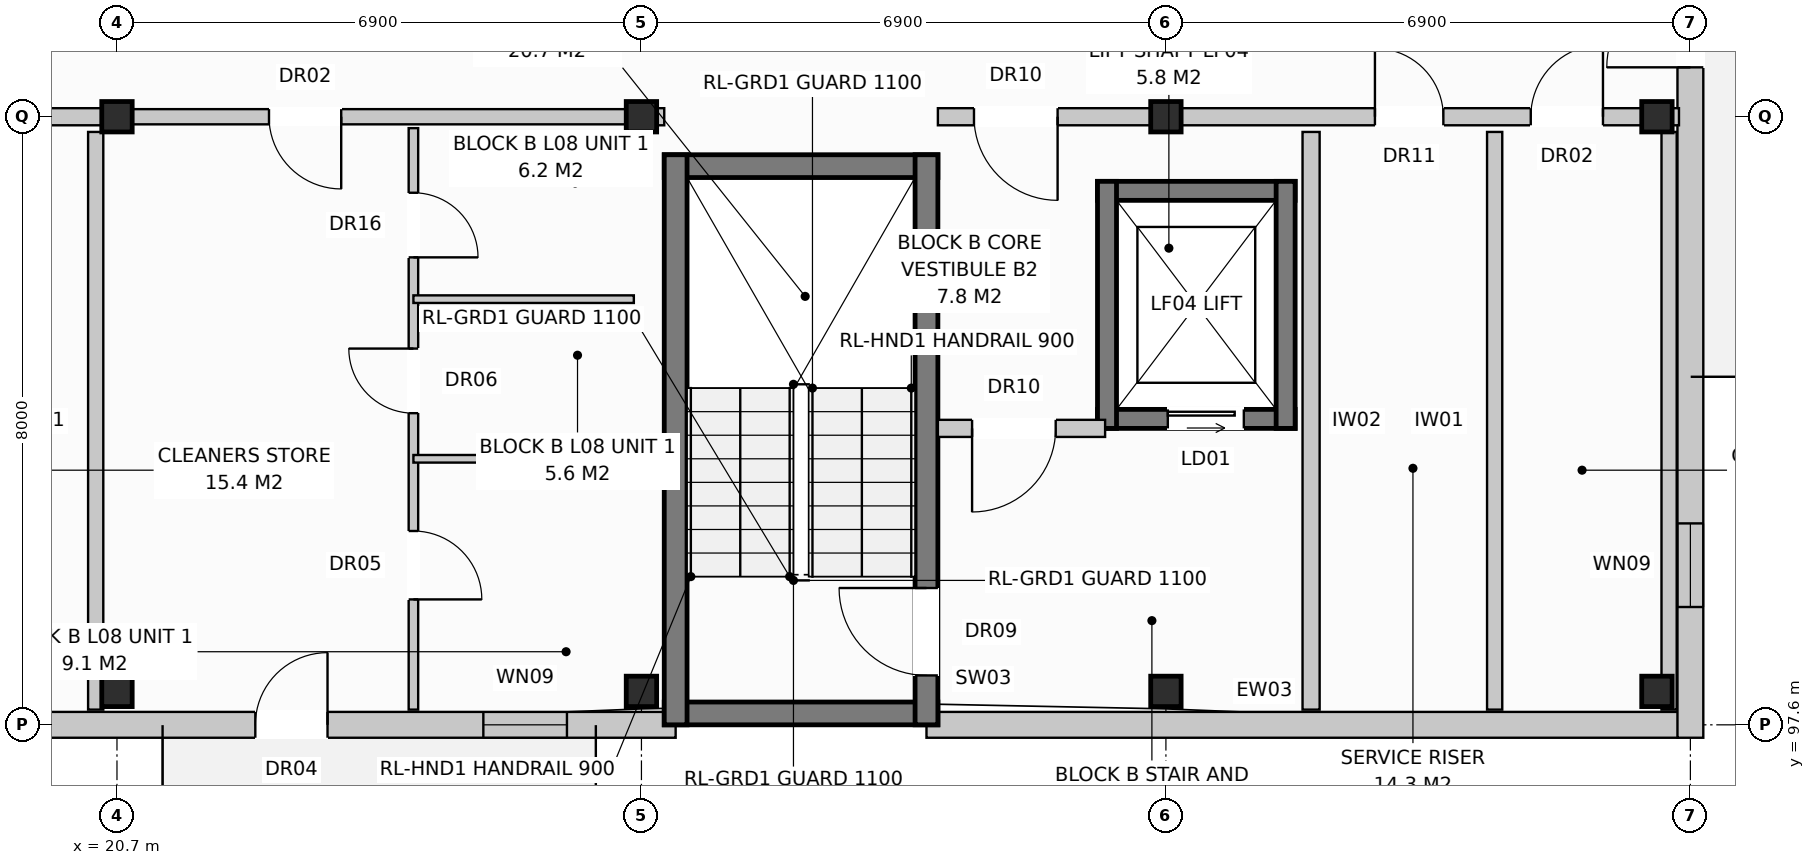
"""IFC4 building model, lengths in metres.
Left out: names, types, materials, properties, quantities, classifications, styles, units other than length and angle.
Written with IfcOpenShell. Run it as: python <this file> out.ifc"""

import sys

from ifc_helpers import new_model, si_unit, direction, frame, frame_2d, origin, origin_with_axes, origin_2d, place, context, subcontext, project, spatial, rectangle, extrude, element, fill, save


model = new_model("IFC4")
c1 = context("Model", 3, precision=1e-05, world=origin(), true_north=direction((0.0, 1.0)))
c2 = subcontext(c1, "Body", "Model", "MODEL_VIEW")
j1 = project(units=[si_unit("LENGTHUNIT", "METRE"), si_unit("PLANEANGLEUNIT", "RADIAN")], contexts=[c1])
p1 = place(None, origin())
s1 = spatial("IfcSite", under=j1, at=p1, CompositionType="ELEMENT")
p2 = place(p1, origin())
s2 = spatial("IfcBuilding", under=s1, at=p2, CompositionType="ELEMENT")
p3 = place(p2, frame((0.0, 0.0, 27.2)))
s3 = spatial("IfcBuildingStorey", under=s2, at=p3, CompositionType="ELEMENT", Elevation=27.2)
for number, where, z_axis, x_axis in (
    (1, (20.7, 98.04, 0.0), (0.0, 0.0, 1.0), (1.0, 0.0, 0.0)),
    (2, (20.7, 105.6, 0.0), (0.0, 0.0, 1.0), (1.0, 0.0, 0.0)),
    (3, (27.6, 98.04, 0.0), (0.0, 0.0, 1.0), (1.0, 0.0, 0.0)),
    (4, (27.6, 105.6, 0.0), (0.0, 0.0, 1.0), (1.0, 0.0, 0.0)),
    (5, (34.5, 98.04, 0.0), (0.0, 0.0, 1.0), (1.0, 0.0, 0.0)),
    (6, (34.5, 105.6, 0.0), (0.0, 0.0, 1.0), (1.0, 0.0, 0.0)),
    (7, (40.96, 98.04, 0.0), (0.0, 0.0, 1.0), (1.0, 0.0, 0.0)),
    (8, (40.96, 105.6, 0.0), (0.0, 0.0, 1.0), (1.0, 0.0, 0.0)),
):
    element("IfcColumn", number, at=place(p3, frame(where, z_axis=z_axis, x_axis=x_axis)), inside=s3, PredefinedType="COLUMN", context=c2, shape_type="SweptSolid", body=[
        extrude(rectangle(XDim=0.4, YDim=0.4, at=origin_2d()), origin(), (0.0, 0.0, 1.0), 3.2),
    ])
p4 = place(p3, frame((10.65, 97.6, 0.0), z_axis=(0.0, 0.0, 1.0), x_axis=(1.0, 0.0, 0.0)))
e9 = element("IfcWall", 9, at=p4, inside=s3, PredefinedType="STANDARD", context=c2, shape_type="SweptSolid", body=[
    extrude(rectangle(XDim=17.4, YDim=0.34, at=frame_2d((8.7, 0.0))), origin(), (0.0, 0.0, 1.0), 2.96),
])
p5 = place(p4, frame((11.87, 0.0, 0.0)))
e10 = element("IfcOpeningElement", 10, at=p5, cuts=e9, PredefinedType="OPENING", context=c2, shape_type="SweptSolid", body=[
    extrude(rectangle(XDim=0.95, YDim=2.1, at=frame_2d((0.475, 1.05))), frame((0.0, 0.182, 0.0), z_axis=(0.0, -1.0, 0.0), x_axis=(1.0, 0.0, 0.0)), (0.0, 0.0, 1.0), 0.364),
])
p6 = place(p4, frame((14.87, 0.0, 0.72)))
e11 = element("IfcOpeningElement", 11, at=p6, cuts=e9, PredefinedType="OPENING", context=c2, shape_type="SweptSolid", body=[
    extrude(rectangle(XDim=1.1, YDim=1.5, at=frame_2d((0.55, 0.75))), frame((0.0, 0.182, 0.0), z_axis=(0.0, -1.0, 0.0), x_axis=(1.0, 0.0, 0.0)), (0.0, 0.0, 1.0), 0.364),
])
p7 = place(p3, frame((31.35, 97.6, 0.0), z_axis=(0.0, 0.0, 1.0), x_axis=(1.0, 0.0, 0.0)))
e12 = element("IfcWall", 12, at=p7, inside=s3, PredefinedType="STANDARD", context=c2, shape_type="SweptSolid", body=[
    extrude(rectangle(XDim=9.89, YDim=0.34, at=frame_2d((4.945, 0.0))), origin(), (0.0, 0.0, 1.0), 2.96),
])
p8 = place(p3, frame((41.4, 97.43, 0.0), z_axis=(0.0, 0.0, 1.0), x_axis=(0.0, 1.0, 0.0)))
e13 = element("IfcWall", 13, at=p8, inside=s3, PredefinedType="STANDARD", context=c2, shape_type="SweptSolid", body=[
    extrude(rectangle(XDim=18.74, YDim=0.34, at=frame_2d((9.37, 0.0))), origin(), (0.0, 0.0, 1.0), 2.96),
])
p9 = place(p8, frame((8.82, 0.0, 0.0)))
e14 = element("IfcOpeningElement", 14, at=p9, cuts=e13, PredefinedType="OPENING", context=c2, shape_type="SweptSolid", body=[
    extrude(rectangle(XDim=1.1, YDim=2.1, at=frame_2d((0.55, 1.05))), frame((0.0, 0.182, 0.0), z_axis=(0.0, -1.0, 0.0), x_axis=(1.0, 0.0, 0.0)), (0.0, 0.0, 1.0), 0.364),
])
p10 = place(p8, frame((1.72, 0.0, 0.72)))
e15 = element("IfcOpeningElement", 15, at=p10, cuts=e13, PredefinedType="OPENING", context=c2, shape_type="SweptSolid", body=[
    extrude(rectangle(XDim=1.1, YDim=1.5, at=frame_2d((0.55, 0.75))), frame((0.0, 0.182, 0.0), z_axis=(0.0, -1.0, 0.0), x_axis=(1.0, 0.0, 0.0)), (0.0, 0.0, 1.0), 0.364),
])
p11 = place(p8, frame((15.92, 0.0, 0.72)))
e16 = element("IfcOpeningElement", 16, at=p11, cuts=e13, PredefinedType="OPENING", context=c2, shape_type="SweptSolid", body=[
    extrude(rectangle(XDim=1.1, YDim=1.5, at=frame_2d((0.55, 0.75))), frame((0.0, 0.182, 0.0), z_axis=(0.0, -1.0, 0.0), x_axis=(1.0, 0.0, 0.0)), (0.0, 0.0, 1.0), 0.364),
])
p12 = place(p3, frame((20.42, 97.8, 0.0), z_axis=(0.0, 0.0, 1.0), x_axis=(0.0, 1.0, 0.0)))
e17 = element("IfcWall", 17, at=p12, inside=s3, PredefinedType="PARTITIONING", context=c2, shape_type="SweptSolid", body=[
    extrude(rectangle(XDim=7.6, YDim=0.2, at=frame_2d((3.8, 0.0))), origin(), (0.0, 0.0, 1.0), 2.96),
])
p13 = place(p3, frame((10.8, 105.6, 0.0), z_axis=(0.0, 0.0, 1.0), x_axis=(1.0, 0.0, 0.0)))
e18 = element("IfcWall", 18, at=p13, inside=s3, PredefinedType="PARTITIONING", context=c2, shape_type="SweptSolid", body=[
    extrude(rectangle(XDim=9.9, YDim=0.225, at=frame_2d((4.95, 0.0))), origin(), (0.0, 0.0, 1.0), 2.4),
])
p14 = place(p13, frame((0.475, 0.0, 0.0)))
e19 = element("IfcOpeningElement", 19, at=p14, cuts=e18, PredefinedType="OPENING", context=c2, shape_type="SweptSolid", body=[
    extrude(rectangle(XDim=1.1, YDim=2.15, at=frame_2d((0.55, 1.075))), frame((0.0, 0.125, 0.0), z_axis=(0.0, -1.0, 0.0), x_axis=(1.0, 0.0, 0.0)), (0.0, 0.0, 1.0), 0.249),
])
p15 = place(p13, frame((5.75, 0.0, 0.0)))
e20 = element("IfcOpeningElement", 20, at=p15, cuts=e18, PredefinedType="OPENING", context=c2, shape_type="SweptSolid", body=[
    extrude(rectangle(XDim=0.9, YDim=2.1, at=frame_2d((0.45, 1.05))), frame((0.0, 0.125, 0.0), z_axis=(0.0, -1.0, 0.0), x_axis=(1.0, 0.0, 0.0)), (0.0, 0.0, 1.0), 0.249),
])
p16 = place(p13, frame((7.8, 0.0, 0.0)))
e21 = element("IfcOpeningElement", 21, at=p16, cuts=e18, PredefinedType="OPENING", context=c2, shape_type="SweptSolid", body=[
    extrude(rectangle(XDim=0.95, YDim=2.15, at=frame_2d((0.475, 1.075))), frame((0.0, 0.125, 0.0), z_axis=(0.0, -1.0, 0.0), x_axis=(1.0, 0.0, 0.0)), (0.0, 0.0, 1.0), 0.249),
])
for number, where, z_axis, x_axis in (
    (22, (27.9, 97.75, 0.0), (0.0, 0.0, 1.0), (1.0, 0.0, 0.0)),
    (23, (27.9, 104.95, 0.0), (0.0, 0.0, 1.0), (1.0, 0.0, 0.0)),
):
    element("IfcWall", number, at=place(p3, frame(where, z_axis=z_axis, x_axis=x_axis)), inside=s3, PredefinedType="SHEAR", context=c2, shape_type="SweptSolid", body=[
        extrude(rectangle(XDim=3.6, YDim=0.3, at=frame_2d((1.8, 0.0))), origin(), (0.0, 0.0, 1.0), 2.96),
    ])
p17 = place(p3, frame((28.05, 97.6, 0.0), z_axis=(0.0, 0.0, 1.0), x_axis=(0.0, 1.0, 0.0)))
e24 = element("IfcWall", 24, at=p17, inside=s3, PredefinedType="SHEAR", context=c2, shape_type="SweptSolid", body=[
    extrude(rectangle(XDim=7.5, YDim=0.3, at=frame_2d((3.75, 0.0))), origin(), (0.0, 0.0, 1.0), 2.96),
])
p18 = place(p3, frame((31.35, 97.6, 0.0), z_axis=(0.0, 0.0, 1.0), x_axis=(0.0, 1.0, 0.0)))
e25 = element("IfcWall", 25, at=p18, inside=s3, PredefinedType="SHEAR", context=c2, shape_type="SweptSolid", body=[
    extrude(rectangle(XDim=7.5, YDim=0.3, at=frame_2d((3.75, 0.0))), origin(), (0.0, 0.0, 1.0), 2.96),
])
p19 = place(p18, frame((0.65, 0.0, 0.0)))
e26 = element("IfcOpeningElement", 26, at=p19, cuts=e25, PredefinedType="OPENING", context=c2, shape_type="SweptSolid", body=[
    extrude(rectangle(XDim=1.15, YDim=2.15, at=frame_2d((0.575, 1.075))), frame((0.0, 0.162, 0.0), z_axis=(0.0, -1.0, 0.0), x_axis=(1.0, 0.0, 0.0)), (0.0, 0.0, 1.0), 0.324),
])
p20 = place(p3, frame((33.6, 101.625, 0.0), z_axis=(0.0, 0.0, 1.0), x_axis=(1.0, 0.0, 0.0)))
e27 = element("IfcWall", 27, at=p20, inside=s3, PredefinedType="SHEAR", context=c2, shape_type="SweptSolid", body=[
    extrude(rectangle(XDim=2.6, YDim=0.25, at=frame_2d((1.3, 0.0))), origin(), (0.0, 0.0, 1.0), 2.96),
])
p21 = place(p20, frame((0.925, 0.0, 0.0)))
e28 = element("IfcOpeningElement", 28, at=p21, cuts=e27, PredefinedType="OPENING", context=c2, shape_type="SweptSolid", body=[
    extrude(rectangle(XDim=1.0, YDim=2.1, at=frame_2d((0.5, 1.05))), frame((0.0, 0.137, 0.0), z_axis=(0.0, -1.0, 0.0), x_axis=(1.0, 0.0, 0.0)), (0.0, 0.0, 1.0), 0.274),
])
p22 = place(p3, frame((33.6, 104.625, 0.0), z_axis=(0.0, 0.0, 1.0), x_axis=(1.0, 0.0, 0.0)))
e29 = element("IfcWall", 29, at=p22, inside=s3, PredefinedType="SHEAR", context=c2, shape_type="SweptSolid", body=[
    extrude(rectangle(XDim=2.6, YDim=0.25, at=frame_2d((1.3, 0.0))), origin(), (0.0, 0.0, 1.0), 2.96),
])
for number, where, z_axis, x_axis in (
    (30, (33.725, 101.5, 0.0), (0.0, 0.0, 1.0), (0.0, 1.0, 0.0)),
    (31, (36.075, 101.5, 0.0), (0.0, 0.0, 1.0), (0.0, 1.0, 0.0)),
):
    element("IfcWall", number, at=place(p3, frame(where, z_axis=z_axis, x_axis=x_axis)), inside=s3, PredefinedType="SHEAR", context=c2, shape_type="SweptSolid", body=[
        extrude(rectangle(XDim=3.25, YDim=0.25, at=frame_2d((1.625, 0.0))), origin(), (0.0, 0.0, 1.0), 2.96),
    ])
p23 = place(p3, frame((36.41, 97.8, 0.0), z_axis=(0.0, 0.0, 1.0), x_axis=(0.0, 1.0, 0.0)))
e32 = element("IfcWall", 32, at=p23, inside=s3, PredefinedType="PARTITIONING", context=c2, shape_type="SweptSolid", body=[
    extrude(rectangle(XDim=7.6, YDim=0.225, at=frame_2d((3.8, 0.0))), origin(), (0.0, 0.0, 1.0), 2.59),
])
p24 = place(p3, frame((31.5, 101.5, 0.0), z_axis=(0.0, 0.0, 1.0), x_axis=(1.0, 0.0, 0.0)))
e33 = element("IfcWall", 33, at=p24, inside=s3, PredefinedType="PARTITIONING", context=c2, shape_type="SweptSolid", body=[
    extrude(rectangle(XDim=2.2, YDim=0.225, at=frame_2d((1.1, 0.0))), origin(), (0.0, 0.0, 1.0), 2.96),
])
p25 = place(p24, frame((0.45, 0.0, 0.0)))
e34 = element("IfcOpeningElement", 34, at=p25, cuts=e33, PredefinedType="OPENING", context=c2, shape_type="SweptSolid", body=[
    extrude(rectangle(XDim=1.1, YDim=2.15, at=frame_2d((0.55, 1.075))), frame((0.0, 0.125, 0.0), z_axis=(0.0, -1.0, 0.0), x_axis=(1.0, 0.0, 0.0)), (0.0, 0.0, 1.0), 0.249),
])
p26 = place(p3, frame((27.6, 105.6, 0.0), z_axis=(0.0, 0.0, 1.0), x_axis=(1.0, 0.0, 0.0)))
e35 = element("IfcWall", 35, at=p26, inside=s3, PredefinedType="PARTITIONING", context=c2, shape_type="SweptSolid", body=[
    extrude(rectangle(XDim=0.3, YDim=0.225, at=frame_2d((0.15, 0.0))), origin(), (0.0, 0.0, 1.0), 2.96),
])
p27 = place(p3, frame((38.825, 97.8, 0.0), z_axis=(0.0, 0.0, 1.0), x_axis=(0.0, 1.0, 0.0)))
e36 = element("IfcWall", 36, at=p27, inside=s3, PredefinedType="PARTITIONING", context=c2, shape_type="SweptSolid", body=[
    extrude(rectangle(XDim=7.6, YDim=0.2, at=frame_2d((3.8, 0.0))), origin(), (0.0, 0.0, 1.0), 2.96),
])
p28 = place(p3, frame((41.12, 97.8, 0.0), z_axis=(0.0, 0.0, 1.0), x_axis=(0.0, 1.0, 0.0)))
e37 = element("IfcWall", 37, at=p28, inside=s3, PredefinedType="PARTITIONING", context=c2, shape_type="SweptSolid", body=[
    extrude(rectangle(XDim=7.6, YDim=0.2, at=frame_2d((3.8, 0.0))), origin(), (0.0, 0.0, 1.0), 2.4),
])
p29 = place(p3, frame((31.5, 105.6, 0.0), z_axis=(0.0, 0.0, 1.0), x_axis=(1.0, 0.0, 0.0)))
e38 = element("IfcWall", 38, at=p29, inside=s3, PredefinedType="PARTITIONING", context=c2, shape_type="SweptSolid", body=[
    extrude(rectangle(XDim=9.75, YDim=0.225, at=frame_2d((4.875, 0.0))), origin(), (0.0, 0.0, 1.0), 2.4),
])
p30 = place(p29, frame((0.475, 0.0, 0.0)))
e39 = element("IfcOpeningElement", 39, at=p30, cuts=e38, PredefinedType="OPENING", context=c2, shape_type="SweptSolid", body=[
    extrude(rectangle(XDim=1.1, YDim=2.15, at=frame_2d((0.55, 1.075))), frame((0.0, 0.125, 0.0), z_axis=(0.0, -1.0, 0.0), x_axis=(1.0, 0.0, 0.0)), (0.0, 0.0, 1.0), 0.249),
])
p31 = place(p29, frame((5.75, 0.0, 0.0)))
e40 = element("IfcOpeningElement", 40, at=p31, cuts=e38, PredefinedType="OPENING", context=c2, shape_type="SweptSolid", body=[
    extrude(rectangle(XDim=0.9, YDim=2.1, at=frame_2d((0.45, 1.05))), frame((0.0, 0.125, 0.0), z_axis=(0.0, -1.0, 0.0), x_axis=(1.0, 0.0, 0.0)), (0.0, 0.0, 1.0), 0.249),
])
p32 = place(p29, frame((7.8, 0.0, 0.0)))
e41 = element("IfcOpeningElement", 41, at=p32, cuts=e38, PredefinedType="OPENING", context=c2, shape_type="SweptSolid", body=[
    extrude(rectangle(XDim=0.95, YDim=2.15, at=frame_2d((0.475, 1.075))), frame((0.0, 0.125, 0.0), z_axis=(0.0, -1.0, 0.0), x_axis=(1.0, 0.0, 0.0)), (0.0, 0.0, 1.0), 0.249),
])
p33 = place(p3, frame((20.7, 105.6, 0.0), z_axis=(0.0, 0.0, 1.0), x_axis=(1.0, 0.0, 0.0)))
e42 = element("IfcWall", 42, at=p33, inside=s3, PredefinedType="PARTITIONING", context=c2, shape_type="SweptSolid", body=[
    extrude(rectangle(XDim=6.9, YDim=0.2, at=frame_2d((3.45, 0.0))), origin(), (0.0, 0.0, 1.0), 2.4),
])
p34 = place(p33, frame((2.0, 0.0, 0.0)))
e43 = element("IfcOpeningElement", 43, at=p34, cuts=e42, PredefinedType="OPENING", context=c2, shape_type="SweptSolid", body=[
    extrude(rectangle(XDim=0.95, YDim=2.15, at=frame_2d((0.475, 1.075))), frame((0.0, 0.112, 0.0), z_axis=(0.0, -1.0, 0.0), x_axis=(1.0, 0.0, 0.0)), (0.0, 0.0, 1.0), 0.224),
])
p35 = place(p3, frame((24.6, 105.45, 0.0), z_axis=(0.0, 0.0, 1.0), x_axis=(0.0, -1.0, 0.0)))
e44 = element("IfcWall", 44, at=p35, inside=s3, PredefinedType="PARTITIONING", context=c2, shape_type="SweptSolid", body=[
    extrude(rectangle(XDim=7.65, YDim=0.125, at=frame_2d((3.825, 0.0))), origin(), (0.0, 0.0, 1.0), 2.96),
])
p36 = place(p35, frame((0.85, 0.0, 0.0)))
e45 = element("IfcOpeningElement", 45, at=p36, cuts=e44, PredefinedType="OPENING", context=c2, shape_type="SweptSolid", body=[
    extrude(rectangle(XDim=0.85, YDim=2.1, at=frame_2d((0.425, 1.05))), frame((0.0, 0.074, 0.0), z_axis=(0.0, -1.0, 0.0), x_axis=(1.0, 0.0, 0.0)), (0.0, 0.0, 1.0), 0.149),
])
p37 = place(p35, frame((2.9, 0.0, 0.0)))
e46 = element("IfcOpeningElement", 46, at=p37, cuts=e44, PredefinedType="OPENING", context=c2, shape_type="SweptSolid", body=[
    extrude(rectangle(XDim=0.85, YDim=2.05, at=frame_2d((0.425, 1.025))), frame((0.0, 0.074, 0.0), z_axis=(0.0, -1.0, 0.0), x_axis=(1.0, 0.0, 0.0)), (0.0, 0.0, 1.0), 0.149),
])
p38 = place(p35, frame((5.3, 0.0, 0.0)))
e47 = element("IfcOpeningElement", 47, at=p38, cuts=e44, PredefinedType="OPENING", context=c2, shape_type="SweptSolid", body=[
    extrude(rectangle(XDim=0.9, YDim=2.1, at=frame_2d((0.45, 1.05))), frame((0.0, 0.074, 0.0), z_axis=(0.0, -1.0, 0.0), x_axis=(1.0, 0.0, 0.0)), (0.0, 0.0, 1.0), 0.149),
])
for number, where, z_axis, x_axis in (
    (48, (24.6, 103.2, 0.0), (0.0, 0.0, 1.0), (1.0, 0.0, 0.0)),
    (49, (24.6, 101.1, 0.0), (0.0, 0.0, 1.0), (1.0, 0.0, 0.0)),
):
    element("IfcWall", number, at=place(p3, frame(where, z_axis=z_axis, x_axis=x_axis)), inside=s3, PredefinedType="PARTITIONING", context=c2, shape_type="SweptSolid", body=[
        extrude(rectangle(XDim=2.9, YDim=0.1, at=frame_2d((1.45, 0.0))), origin(), (0.0, 0.0, 1.0), 2.96),
    ])
p39 = place(p5, origin_with_axes())
e50 = element("IfcDoor", 50, at=p39, inside=s3, OperationType="SINGLE_SWING_RIGHT", PredefinedType="DOOR", context=c2, shape_type="SweptSolid", body=[
    extrude(rectangle(XDim=0.95, YDim=2.1, at=frame_2d((0.475, 1.05))), frame((0.0, 0.025, 0.0), z_axis=(0.0, -1.0, 0.0), x_axis=(1.0, 0.0, 0.0)), (0.0, 0.0, 1.0), 0.05),
])
fill(e10, e50)
p40 = place(p6, origin_with_axes())
e51 = element("IfcWindow", 51, at=p40, inside=s3, PartitioningType="SINGLE_PANEL", PredefinedType="WINDOW", context=c2, shape_type="SweptSolid", body=[
    extrude(rectangle(XDim=1.1, YDim=1.5, at=frame_2d((0.55, 0.75))), frame((0.0, 0.03, 0.0), z_axis=(0.0, -1.0, 0.0), x_axis=(1.0, 0.0, 0.0)), (0.0, 0.0, 1.0), 0.06),
])
fill(e11, e51)
p41 = place(p9, origin_with_axes())
e52 = element("IfcDoor", 52, at=p41, inside=s3, OperationType="SINGLE_SWING_LEFT", PredefinedType="DOOR", context=c2, shape_type="SweptSolid", body=[
    extrude(rectangle(XDim=1.1, YDim=2.1, at=frame_2d((0.55, 1.05))), frame((0.0, 0.025, 0.0), z_axis=(0.0, -1.0, 0.0), x_axis=(1.0, 0.0, 0.0)), (0.0, 0.0, 1.0), 0.05),
])
fill(e14, e52)
p42 = place(p10, origin_with_axes())
e53 = element("IfcWindow", 53, at=p42, inside=s3, PartitioningType="SINGLE_PANEL", PredefinedType="WINDOW", context=c2, shape_type="SweptSolid", body=[
    extrude(rectangle(XDim=1.1, YDim=1.5, at=frame_2d((0.55, 0.75))), frame((0.0, 0.03, 0.0), z_axis=(0.0, -1.0, 0.0), x_axis=(1.0, 0.0, 0.0)), (0.0, 0.0, 1.0), 0.06),
])
fill(e15, e53)
p43 = place(p19, origin_with_axes())
e54 = element("IfcDoor", 54, at=p43, inside=s3, OperationType="SINGLE_SWING_RIGHT", PredefinedType="DOOR", context=c2, shape_type="SweptSolid", body=[
    extrude(rectangle(XDim=1.15, YDim=2.15, at=frame_2d((0.575, 1.075))), frame((0.0, 0.025, 0.0), z_axis=(0.0, -1.0, 0.0), x_axis=(1.0, 0.0, 0.0)), (0.0, 0.0, 1.0), 0.05),
])
fill(e26, e54)
p44 = place(p21, origin_with_axes())
e55 = element("IfcDoor", 55, at=p44, inside=s3, OperationType="SLIDING_TO_LEFT", PredefinedType="DOOR", context=c2, shape_type="SweptSolid", body=[
    extrude(rectangle(XDim=1.0, YDim=2.1, at=frame_2d((0.5, 1.05))), frame((0.0, 0.025, 0.0), z_axis=(0.0, -1.0, 0.0), x_axis=(1.0, 0.0, 0.0)), (0.0, 0.0, 1.0), 0.05),
])
fill(e28, e55)
p45 = place(p25, frame((1.1, 0.0, 0.0), z_axis=(0.0, 0.0, 1.0), x_axis=(-1.0, 0.0, 0.0)))
e56 = element("IfcDoor", 56, at=p45, inside=s3, OperationType="SINGLE_SWING_LEFT", PredefinedType="DOOR", context=c2, shape_type="SweptSolid", body=[
    extrude(rectangle(XDim=1.1, YDim=2.15, at=frame_2d((0.55, 1.075))), frame((0.0, 0.025, 0.0), z_axis=(0.0, -1.0, 0.0), x_axis=(1.0, 0.0, 0.0)), (0.0, 0.0, 1.0), 0.05),
])
fill(e34, e56)
p46 = place(p30, frame((1.1, 0.0, 0.0), z_axis=(0.0, 0.0, 1.0), x_axis=(-1.0, 0.0, 0.0)))
e57 = element("IfcDoor", 57, at=p46, inside=s3, OperationType="SINGLE_SWING_RIGHT", PredefinedType="DOOR", context=c2, shape_type="SweptSolid", body=[
    extrude(rectangle(XDim=1.1, YDim=2.15, at=frame_2d((0.55, 1.075))), frame((0.0, 0.025, 0.0), z_axis=(0.0, -1.0, 0.0), x_axis=(1.0, 0.0, 0.0)), (0.0, 0.0, 1.0), 0.05),
])
fill(e39, e57)
p47 = place(p31, origin_with_axes())
e58 = element("IfcDoor", 58, at=p47, inside=s3, OperationType="SINGLE_SWING_LEFT", PredefinedType="DOOR", context=c2, shape_type="SweptSolid", body=[
    extrude(rectangle(XDim=0.9, YDim=2.1, at=frame_2d((0.45, 1.05))), frame((0.0, 0.025, 0.0), z_axis=(0.0, -1.0, 0.0), x_axis=(1.0, 0.0, 0.0)), (0.0, 0.0, 1.0), 0.05),
])
fill(e40, e58)
p48 = place(p32, origin_with_axes())
e59 = element("IfcDoor", 59, at=p48, inside=s3, OperationType="SINGLE_SWING_RIGHT", PredefinedType="DOOR", context=c2, shape_type="SweptSolid", body=[
    extrude(rectangle(XDim=0.95, YDim=2.15, at=frame_2d((0.475, 1.075))), frame((0.0, 0.025, 0.0), z_axis=(0.0, -1.0, 0.0), x_axis=(1.0, 0.0, 0.0)), (0.0, 0.0, 1.0), 0.05),
])
fill(e41, e59)
p49 = place(p34, frame((0.95, 0.0, 0.0), z_axis=(0.0, 0.0, 1.0), x_axis=(-1.0, 0.0, 0.0)))
e60 = element("IfcDoor", 60, at=p49, inside=s3, OperationType="SINGLE_SWING_RIGHT", PredefinedType="DOOR", context=c2, shape_type="SweptSolid", body=[
    extrude(rectangle(XDim=0.95, YDim=2.15, at=frame_2d((0.475, 1.075))), frame((0.0, 0.025, 0.0), z_axis=(0.0, -1.0, 0.0), x_axis=(1.0, 0.0, 0.0)), (0.0, 0.0, 1.0), 0.05),
])
fill(e43, e60)
p50 = place(p36, origin_with_axes())
e61 = element("IfcDoor", 61, at=p50, inside=s3, OperationType="SINGLE_SWING_RIGHT", PredefinedType="DOOR", context=c2, shape_type="SweptSolid", body=[
    extrude(rectangle(XDim=0.85, YDim=2.1, at=frame_2d((0.425, 1.05))), frame((0.0, 0.025, 0.0), z_axis=(0.0, -1.0, 0.0), x_axis=(1.0, 0.0, 0.0)), (0.0, 0.0, 1.0), 0.05),
])
fill(e45, e61)
p51 = place(p37, frame((0.85, 0.0, 0.0), z_axis=(0.0, 0.0, 1.0), x_axis=(-1.0, 0.0, 0.0)))
e62 = element("IfcDoor", 62, at=p51, inside=s3, OperationType="SINGLE_SWING_LEFT", PredefinedType="DOOR", context=c2, shape_type="SweptSolid", body=[
    extrude(rectangle(XDim=0.85, YDim=2.05, at=frame_2d((0.425, 1.025))), frame((0.0, 0.025, 0.0), z_axis=(0.0, -1.0, 0.0), x_axis=(1.0, 0.0, 0.0)), (0.0, 0.0, 1.0), 0.05),
])
fill(e46, e62)
p52 = place(p38, origin_with_axes())
e63 = element("IfcDoor", 63, at=p52, inside=s3, OperationType="SINGLE_SWING_RIGHT", PredefinedType="DOOR", context=c2, shape_type="SweptSolid", body=[
    extrude(rectangle(XDim=0.9, YDim=2.1, at=frame_2d((0.45, 1.05))), frame((0.0, 0.025, 0.0), z_axis=(0.0, -1.0, 0.0), x_axis=(1.0, 0.0, 0.0)), (0.0, 0.0, 1.0), 0.05),
])
fill(e47, e63)
save(model, sys.argv[1])
